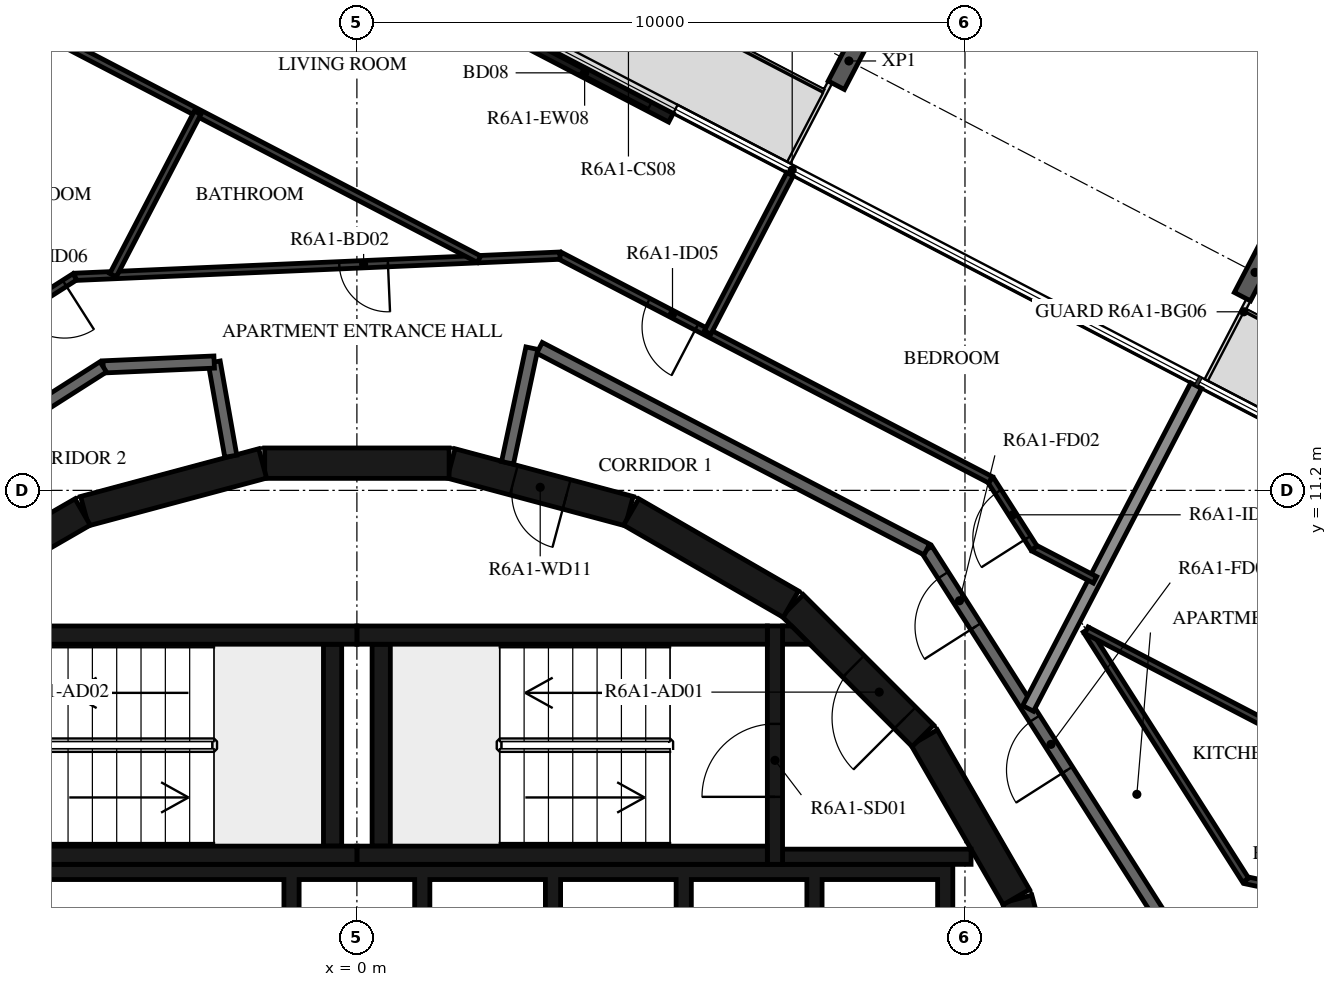
"""IFC4 building model, lengths in metres.
Left out: names, types, materials, properties, quantities, classifications, styles, units other than length and angle.
Written with IfcOpenShell. Run it as: python <this file> out.ifc"""

import sys

from ifc_helpers import new_model, si_unit, direction, frame, frame_2d, origin, origin_2d, place, context, subcontext, project, spatial, polyline, rectangle, i_section, outline, extrude, element, fill, save


model = new_model("IFC4")
c1 = context("Model", 3, precision=1e-05, world=origin(), true_north=direction((0.0, 1.0)))
c2 = subcontext(c1, "Body", "Model", "MODEL_VIEW")
j1 = project(units=[si_unit("LENGTHUNIT", "METRE"), si_unit("PLANEANGLEUNIT", "RADIAN")], contexts=[c1])
p1 = place(None, origin())
s1 = spatial("IfcSite", under=j1, at=p1, CompositionType="ELEMENT")
p2 = place(p1, origin())
s2 = spatial("IfcBuilding", under=s1, at=p2, CompositionType="ELEMENT")
p3 = place(p2, frame((0.0, 0.0, 230.2)))
s3 = spatial("IfcBuildingStorey", under=s2, at=p3, CompositionType="ELEMENT", Elevation=230.2)
for number, where, z_axis, x_axis in (
    (1, (14.771, 14.784, -0.38), (0.0, 0.0, 1.0), (0.887, -0.462, 0.0)),
    (2, (8.091, 18.261, -0.38), (0.0, 0.0, 1.0), (0.887, -0.462, 0.0)),
):
    element("IfcColumn", number, at=place(p3, frame(where, z_axis=z_axis, x_axis=x_axis)), inside=s3, PredefinedType="COLUMN", context=c2, shape_type="SweptSolid", body=[
        extrude(i_section(OverallWidth=0.3, OverallDepth=0.9, WebThickness=0.019, FlangeThickness=0.035, FilletRadius=0.03, at=origin_2d()), origin(), (0.0, 0.0, 1.0), 3.5),
    ])
p4 = place(p3, frame((5.164, 17.327, 0.0), z_axis=(0.0, 0.0, 1.0), x_axis=(-0.886983100078, 0.461801884119, 0.0)))
e3 = element("IfcWall", 3, at=p4, inside=s3, PredefinedType="STANDARD", context=c2, shape_type="SweptSolid", body=[
    extrude(rectangle(XDim=3.2, YDim=0.16, at=frame_2d((1.6, 0.0))), origin(), (0.0, 0.0, 1.0), 3.12),
])
p5 = place(p4, frame((0.4, 0.0, 0.0)))
e4 = element("IfcOpeningElement", 4, at=p5, cuts=e3, PredefinedType="OPENING", context=c2, shape_type="SweptSolid", body=[
    extrude(rectangle(XDim=2.4, YDim=2.4, at=frame_2d((1.2, 1.2))), frame((0.0, 0.09, 0.0), z_axis=(0.0, -1.0, 0.0), x_axis=(1.0, 0.0, 0.0)), (0.0, 0.0, 1.0), 0.18),
])
for number, where, z_axis, x_axis in (
    (5, (11.643, 1.55, 0.0), (0.0, 0.0, 1.0), (-0.259, 0.966, 0.0)),
    (6, (10.845, 4.51, 0.0), (0.0, 0.0, 1.0), (-0.5, 0.866, 0.0)),
):
    element("IfcWall", number, at=place(p3, frame(where, z_axis=z_axis, x_axis=x_axis)), inside=s3, PredefinedType="SHEAR", context=c2, shape_type="SweptSolid", body=[
        extrude(rectangle(XDim=3.033, YDim=0.5, at=frame_2d((1.516, 0.0))), origin(), (0.0, 0.0, 1.0), 3.12),
    ])
p6 = place(p3, frame((9.308, 7.164, 0.0), z_axis=(0.0, 0.0, 1.0), x_axis=(-0.707106781187, 0.707106781187, 0.0)))
e7 = element("IfcWall", 7, at=p6, inside=s3, PredefinedType="SHEAR", context=c2, shape_type="SweptSolid", body=[
    extrude(rectangle(XDim=3.032, YDim=0.5, at=frame_2d((1.516, 0.0))), origin(), (0.0, 0.0, 1.0), 3.12),
])
p7 = place(p6, frame((0.416, 0.0, 0.0)))
e8 = element("IfcOpeningElement", 8, at=p7, cuts=e7, PredefinedType="OPENING", context=c2, shape_type="SweptSolid", body=[
    extrude(rectangle(XDim=1.2, YDim=2.1, at=frame_2d((0.6, 1.05))), frame((0.0, 0.26, 0.0), z_axis=(0.0, -1.0, 0.0), x_axis=(1.0, 0.0, 0.0)), (0.0, 0.0, 1.0), 0.52),
])
p8 = place(p3, frame((7.137, 9.329, 0.0), z_axis=(0.0, 0.0, 1.0), x_axis=(-0.865975092491, 0.500087131594, 0.0)))
e9 = element("IfcWall", 9, at=p8, inside=s3, PredefinedType="SHEAR", context=c2, shape_type="SweptSolid", body=[
    extrude(rectangle(XDim=3.033, YDim=0.5, at=frame_2d((1.516, 0.0))), origin(), (0.0, 0.0, 1.0), 3.12),
])
p9 = place(p3, frame((4.479, 10.858, 0.0), z_axis=(0.0, 0.0, 1.0), x_axis=(-0.965948410781, 0.258734743916, 0.0)))
e10 = element("IfcWall", 10, at=p9, inside=s3, PredefinedType="SHEAR", context=c2, shape_type="SweptSolid", body=[
    extrude(rectangle(XDim=3.033, YDim=0.5, at=frame_2d((1.516, 0.0))), origin(), (0.0, 0.0, 1.0), 3.12),
])
p10 = place(p9, frame((1.066, 0.0, 0.0)))
e11 = element("IfcOpeningElement", 11, at=p10, cuts=e10, PredefinedType="OPENING", context=c2, shape_type="SweptSolid", body=[
    extrude(rectangle(XDim=0.9, YDim=2.1, at=frame_2d((0.45, 1.05))), frame((0.0, 0.26, 0.0), z_axis=(0.0, -1.0, 0.0), x_axis=(1.0, 0.0, 0.0)), (0.0, 0.0, 1.0), 0.52),
])
for number, where, z_axis, x_axis in (
    (12, (1.516, 11.647, 0.0), (0.0, 0.0, 1.0), (-1.0, 0.0, 0.0)),
    (13, (-1.55, 11.643, 0.0), (0.0, 0.0, 1.0), (-0.966, -0.259, 0.0)),
    (14, (-4.51, 10.845, 0.0), (0.0, 0.0, 1.0), (-0.866, -0.5, 0.0)),
):
    element("IfcWall", number, at=place(p3, frame(where, z_axis=z_axis, x_axis=x_axis)), inside=s3, PredefinedType="SHEAR", context=c2, shape_type="SweptSolid", body=[
        extrude(rectangle(XDim=3.033, YDim=0.5, at=frame_2d((1.516, 0.0))), origin(), (0.0, 0.0, 1.0), 3.12),
    ])
for number, where, z_axis, x_axis in (
    (15, (0.0, 5.2, 0.0), (0.0, 0.0, 1.0), (1.0, 0.0, 0.0)),
    (16, (0.0, 8.82, 0.0), (0.0, 0.0, 1.0), (1.0, 0.0, 0.0)),
):
    element("IfcWall", number, at=place(p3, frame(where, z_axis=z_axis, x_axis=x_axis)), inside=s3, PredefinedType="SHEAR", context=c2, shape_type="SweptSolid", body=[
        extrude(rectangle(XDim=6.75, YDim=0.3, at=frame_2d((3.375, 0.0))), origin(), (0.0, 0.0, 1.0), 3.12),
    ])
p11 = place(p3, frame((0.4, 5.35, 0.0), z_axis=(0.0, 0.0, 1.0), x_axis=(0.0, 1.0, 0.0)))
e17 = element("IfcWall", 17, at=p11, inside=s3, PredefinedType="SHEAR", context=c2, shape_type="SweptSolid", body=[
    extrude(rectangle(XDim=3.32, YDim=0.3, at=frame_2d((1.66, 0.0))), origin(), (0.0, 0.0, 1.0), 3.12),
])
p12 = place(p3, frame((6.875, 5.05, 0.0), z_axis=(0.0, 0.0, 1.0), x_axis=(0.0, 1.0, 0.0)))
e18 = element("IfcWall", 18, at=p12, inside=s3, PredefinedType="SHEAR", context=c2, shape_type="SweptSolid", body=[
    extrude(rectangle(XDim=3.92, YDim=0.25, at=frame_2d((1.96, 0.0))), origin(), (0.0, 0.0, 1.0), 3.12),
])
p13 = place(p12, frame((1.11, 0.0, 0.0)))
e19 = element("IfcOpeningElement", 19, at=p13, cuts=e18, PredefinedType="OPENING", context=c2, shape_type="SweptSolid", body=[
    extrude(rectangle(XDim=1.2, YDim=2.1, at=frame_2d((0.6, 1.05))), frame((0.0, 0.135, 0.0), z_axis=(0.0, -1.0, 0.0), x_axis=(1.0, 0.0, 0.0)), (0.0, 0.0, 1.0), 0.27),
])
p14 = place(p3, frame((7.0, 5.175, 0.0), z_axis=(0.0, 0.0, 1.0), x_axis=(1.0, 0.0, 0.0)))
e20 = element("IfcWall", 20, at=p14, inside=s3, PredefinedType="SHEAR", context=c2, shape_type="SweptSolid", body=[
    extrude(rectangle(XDim=3.1, YDim=0.25, at=frame_2d((1.55, 0.0))), origin(), (0.0, 0.0, 1.0), 3.12),
])
p15 = place(p3, origin())
e21 = element("IfcWall", 21, at=p15, inside=s3, PredefinedType="SHEAR", context=c2, shape_type="SweptSolid", body=[
    extrude(outline(polyline([(7.448, 8.67), (7.0, 8.67), (7.0, 8.97), (7.148, 8.97), (7.448, 8.67)])), origin(), (0.0, 0.0, 1.0), 3.12),
])
for number, where, z_axis, x_axis in (
    (22, (-6.75, 5.2, 0.0), (0.0, 0.0, 1.0), (1.0, 0.0, 0.0)),
    (23, (-6.75, 8.82, 0.0), (0.0, 0.0, 1.0), (1.0, 0.0, 0.0)),
):
    element("IfcWall", number, at=place(p3, frame(where, z_axis=z_axis, x_axis=x_axis)), inside=s3, PredefinedType="SHEAR", context=c2, shape_type="SweptSolid", body=[
        extrude(rectangle(XDim=6.75, YDim=0.3, at=frame_2d((3.375, 0.0))), origin(), (0.0, 0.0, 1.0), 3.12),
    ])
p16 = place(p3, frame((-0.4, 5.35, 0.0), z_axis=(0.0, 0.0, 1.0), x_axis=(0.0, 1.0, 0.0)))
e24 = element("IfcWall", 24, at=p16, inside=s3, PredefinedType="SHEAR", context=c2, shape_type="SweptSolid", body=[
    extrude(rectangle(XDim=3.32, YDim=0.3, at=frame_2d((1.66, 0.0))), origin(), (0.0, 0.0, 1.0), 3.12),
])
p17 = place(p3, origin())
e25 = element("IfcWall", 25, at=p17, inside=s3, PredefinedType="SHEAR", context=c2, shape_type="SweptSolid", body=[
    extrude(outline(polyline([(-9.55, 4.8), (-5.5, 4.8), (-5.5, 1.9), (-5.25, 1.9), (-5.25, 4.8), (-1.2, 4.8), (-1.2, 1.9), (-0.95, 1.9), (-0.95, 4.8), (0.95, 4.8), (0.95, 1.9), (1.2, 1.9), (1.2, 4.8), (3.1, 4.8), (3.1, 1.9), (3.35, 1.9), (3.35, 4.8), (5.25, 4.8), (5.25, 1.9), (5.5, 1.9), (5.5, 4.8), (7.4, 4.8), (7.4, 1.9), (7.65, 1.9), (7.65, 4.8), (9.55, 4.8), (9.55, 1.9), (9.8, 1.9), (9.8, 4.8), (9.8, 5.05), (-9.8, 5.05), (-9.8, 4.8), (-9.8, 1.9), (-9.55, 1.9), (-9.55, 4.8)])), origin(), (0.0, 0.0, 1.0), 3.12),
])
p18 = place(p3, frame((13.231, 4.172, 0.0), z_axis=(0.0, 0.0, 1.0), x_axis=(-0.537304397561, 0.843388394728, 0.0)))
e26 = element("IfcWall", 26, at=p18, inside=s3, PredefinedType="STANDARD", context=c2, shape_type="SweptSolid", body=[
    extrude(rectangle(XDim=7.181, YDim=0.2, at=frame_2d((3.59, 0.0))), origin(), (0.0, 0.0, 1.0), 3.12),
])
p19 = place(p18, frame((2.881, 0.0, 0.0)))
e27 = element("IfcOpeningElement", 27, at=p19, cuts=e26, PredefinedType="OPENING", context=c2, shape_type="SweptSolid", body=[
    extrude(rectangle(XDim=1.0, YDim=2.1, at=frame_2d((0.5, 1.05))), frame((0.0, 0.11, 0.0), z_axis=(0.0, -1.0, 0.0), x_axis=(1.0, 0.0, 0.0)), (0.0, 0.0, 1.0), 0.22),
])
p20 = place(p18, frame((5.681, 0.0, 0.0)))
e28 = element("IfcOpeningElement", 28, at=p20, cuts=e26, PredefinedType="OPENING", context=c2, shape_type="SweptSolid", body=[
    extrude(rectangle(XDim=1.0, YDim=2.1, at=frame_2d((0.5, 1.05))), frame((0.0, 0.11, 0.0), z_axis=(0.0, -1.0, 0.0), x_axis=(1.0, 0.0, 0.0)), (0.0, 0.0, 1.0), 0.22),
])
p21 = place(p3, frame((9.372, 10.228, 0.0), z_axis=(0.0, 0.0, 1.0), x_axis=(-0.887005184532, 0.461759464021, 0.0)))
e29 = element("IfcWall", 29, at=p21, inside=s3, PredefinedType="STANDARD", context=c2, shape_type="SweptSolid", body=[
    extrude(rectangle(XDim=7.181, YDim=0.2, at=frame_2d((3.591, 0.0))), origin(), (0.0, 0.0, 1.0), 3.12),
])
p22 = place(p3, frame((2.878, 13.538, 0.0), z_axis=(0.0, 0.0, 1.0), x_axis=(-0.207893604596, -0.978151444904, 0.0)))
e30 = element("IfcWall", 30, at=p22, inside=s3, PredefinedType="STANDARD", context=c2, shape_type="SweptSolid", body=[
    extrude(rectangle(XDim=1.927, YDim=0.2, at=frame_2d((0.963, 0.0))), origin(), (0.0, 0.0, 1.0), 3.12),
])
p23 = place(p3, frame((-2.074, 11.761, 0.0), z_axis=(0.0, 0.0, 1.0), x_axis=(-0.173679082312, 0.984802303189, 0.0)))
e31 = element("IfcWall", 31, at=p23, inside=s3, PredefinedType="STANDARD", context=c2, shape_type="SweptSolid", body=[
    extrude(rectangle(XDim=1.573, YDim=0.2, at=frame_2d((0.787, 0.0))), origin(), (0.0, 0.0, 1.0), 3.12),
])
p24 = place(p3, frame((-2.347, 13.31, 0.0), z_axis=(0.0, 0.0, 1.0), x_axis=(-0.999050095671, -0.043576442492, 0.0)))
e32 = element("IfcWall", 32, at=p24, inside=s3, PredefinedType="STANDARD", context=c2, shape_type="SweptSolid", body=[
    extrude(rectangle(XDim=1.826, YDim=0.2, at=frame_2d((0.913, 0.0))), origin(), (0.0, 0.0, 1.0), 3.12),
])
p25 = place(p3, frame((-4.172, 13.231, 0.0), z_axis=(0.0, 0.0, 1.0), x_axis=(-0.843388394728, -0.537304397561, 0.0)))
e33 = element("IfcWall", 33, at=p25, inside=s3, PredefinedType="STANDARD", context=c2, shape_type="SweptSolid", body=[
    extrude(rectangle(XDim=7.181, YDim=0.2, at=frame_2d((3.59, 0.0))), origin(), (0.0, 0.0, 1.0), 3.12),
])
p26 = place(p3, frame((13.801, 12.922, 0.0), z_axis=(0.0, 0.0, 1.0), x_axis=(-0.461726485624, -0.887022351733, 0.0)))
e34 = element("IfcWall", 34, at=p26, inside=s3, PredefinedType="STANDARD", context=c2, shape_type="SweptSolid", body=[
    extrude(rectangle(XDim=5.984, YDim=0.2, at=frame_2d((2.992, 0.0))), origin(), (0.0, 0.0, 1.0), 2.73),
])
p27 = place(p3, frame((19.505, 3.763, 0.0), z_axis=(0.0, 0.0, 1.0), x_axis=(-0.978660081285, 0.205485876157, 0.0)))
e35 = element("IfcWall", 35, at=p27, inside=s3, PredefinedType="PARTITIONING", context=c2, shape_type="SweptSolid", body=[
    extrude(rectangle(XDim=4.996, YDim=0.12, at=frame_2d((2.498, 0.0))), origin(), (0.0, 0.0, 1.0), 3.12),
])
p28 = place(p27, frame((0.2, 0.0, 0.0)))
e36 = element("IfcOpeningElement", 36, at=p28, cuts=e35, PredefinedType="OPENING", context=c2, shape_type="SweptSolid", body=[
    extrude(rectangle(XDim=0.8, YDim=2.1, at=frame_2d((0.4, 1.05))), frame((0.0, 0.07, 0.0), z_axis=(0.0, -1.0, 0.0), x_axis=(1.0, 0.0, 0.0)), (0.0, 0.0, 1.0), 0.14),
])
p29 = place(p27, frame((2.869, 0.0, 0.0)))
e37 = element("IfcOpeningElement", 37, at=p29, cuts=e35, PredefinedType="OPENING", context=c2, shape_type="SweptSolid", body=[
    extrude(rectangle(XDim=0.9, YDim=2.1, at=frame_2d((0.45, 1.05))), frame((0.0, 0.07, 0.0), z_axis=(0.0, -1.0, 0.0), x_axis=(1.0, 0.0, 0.0)), (0.0, 0.0, 1.0), 0.14),
])
p30 = place(p3, frame((14.615, 4.79, 0.0), z_axis=(0.0, 0.0, 1.0), x_axis=(-0.537312928062, 0.843382960071, 0.0)))
e38 = element("IfcWall", 38, at=p30, inside=s3, PredefinedType="PARTITIONING", context=c2, shape_type="SweptSolid", body=[
    extrude(rectangle(XDim=4.875, YDim=0.12, at=frame_2d((2.437, 0.0))), origin(), (0.0, 0.0, 1.0), 3.12),
])
p31 = place(p3, frame((21.085, 4.169, 0.0), z_axis=(0.0, 0.0, 1.0), x_axis=(-0.887017373034, 0.461736050071, 0.0)))
e39 = element("IfcWall", 39, at=p31, inside=s3, PredefinedType="PARTITIONING", context=c2, shape_type="SweptSolid", body=[
    extrude(rectangle(XDim=10.247, YDim=0.12, at=frame_2d((5.123, 0.0))), origin(), (0.0, 0.0, 1.0), 3.12),
])
p32 = place(p31, frame((3.425, 0.0, 0.0)))
e40 = element("IfcOpeningElement", 40, at=p32, cuts=e39, PredefinedType="OPENING", context=c2, shape_type="SweptSolid", body=[
    extrude(rectangle(XDim=0.9, YDim=2.1, at=frame_2d((0.45, 1.05))), frame((0.0, 0.07, 0.0), z_axis=(0.0, -1.0, 0.0), x_axis=(1.0, 0.0, 0.0)), (0.0, 0.0, 1.0), 0.14),
])
p33 = place(p3, frame((12.139, 9.729, 0.0), z_axis=(0.0, 0.0, 1.0), x_axis=(-0.887046876331, 0.461679368383, 0.0)))
e41 = element("IfcWall", 41, at=p33, inside=s3, PredefinedType="PARTITIONING", context=c2, shape_type="SweptSolid", body=[
    extrude(rectangle(XDim=1.13, YDim=0.12, at=frame_2d((0.565, 0.0))), origin(), (0.0, 0.0, 1.0), 3.12),
])
p34 = place(p3, frame((11.137, 10.25, 0.0), z_axis=(0.0, 0.0, 1.0), x_axis=(-0.537231369635, 0.843434914786, 0.0)))
e42 = element("IfcWall", 42, at=p34, inside=s3, PredefinedType="PARTITIONING", context=c2, shape_type="SweptSolid", body=[
    extrude(rectangle(XDim=1.332, YDim=0.12, at=frame_2d((0.666, 0.0))), origin(), (0.0, 0.0, 1.0), 3.12),
])
p35 = place(p34, frame((0.2, 0.0, 0.0)))
e43 = element("IfcOpeningElement", 43, at=p35, cuts=e42, PredefinedType="OPENING", context=c2, shape_type="SweptSolid", body=[
    extrude(rectangle(XDim=0.9, YDim=2.1, at=frame_2d((0.45, 1.05))), frame((0.0, 0.07, 0.0), z_axis=(0.0, -1.0, 0.0), x_axis=(1.0, 0.0, 0.0)), (0.0, 0.0, 1.0), 0.14),
])
p36 = place(p3, frame((10.421, 11.373, 0.0), z_axis=(0.0, 0.0, 1.0), x_axis=(-0.887012970857, 0.461744506769, 0.0)))
e44 = element("IfcWall", 44, at=p36, inside=s3, PredefinedType="PARTITIONING", context=c2, shape_type="SweptSolid", body=[
    extrude(rectangle(XDim=7.985, YDim=0.12, at=frame_2d((3.992, 0.0))), origin(), (0.0, 0.0, 1.0), 3.12),
])
p37 = place(p36, frame((5.448, 0.0, 0.0)))
e45 = element("IfcOpeningElement", 45, at=p37, cuts=e44, PredefinedType="OPENING", context=c2, shape_type="SweptSolid", body=[
    extrude(rectangle(XDim=0.9, YDim=2.1, at=frame_2d((0.45, 1.05))), frame((0.0, 0.07, 0.0), z_axis=(0.0, -1.0, 0.0), x_axis=(1.0, 0.0, 0.0)), (0.0, 0.0, 1.0), 0.14),
])
p38 = place(p3, frame((3.339, 15.06, 0.0), z_axis=(0.0, 0.0, 1.0), x_axis=(-0.999047716945, -0.043630943905, 0.0)))
e46 = element("IfcWall", 46, at=p38, inside=s3, PredefinedType="PARTITIONING", context=c2, shape_type="SweptSolid", body=[
    extrude(rectangle(XDim=7.985, YDim=0.12, at=frame_2d((3.992, 0.0))), origin(), (0.0, 0.0, 1.0), 3.12),
])
p39 = place(p38, frame((2.831, 0.0, 0.0)))
e47 = element("IfcOpeningElement", 47, at=p39, cuts=e46, PredefinedType="OPENING", context=c2, shape_type="SweptSolid", body=[
    extrude(rectangle(XDim=0.8, YDim=2.1, at=frame_2d((0.4, 1.05))), frame((0.0, 0.07, 0.0), z_axis=(0.0, -1.0, 0.0), x_axis=(1.0, 0.0, 0.0)), (0.0, 0.0, 1.0), 0.14),
])
p40 = place(p3, frame((-4.639, 14.712, 0.0), z_axis=(0.0, 0.0, 1.0), x_axis=(-0.843361471414, -0.537346655833, 0.0)))
e48 = element("IfcWall", 48, at=p40, inside=s3, PredefinedType="PARTITIONING", context=c2, shape_type="SweptSolid", body=[
    extrude(rectangle(XDim=1.844, YDim=0.12, at=frame_2d((0.922, 0.0))), origin(), (0.0, 0.0, 1.0), 3.12),
])
p41 = place(p40, frame((0.2, 0.0, 0.0)))
e49 = element("IfcOpeningElement", 49, at=p41, cuts=e48, PredefinedType="OPENING", context=c2, shape_type="SweptSolid", body=[
    extrude(rectangle(XDim=0.9, YDim=2.1, at=frame_2d((0.45, 1.05))), frame((0.0, 0.07, 0.0), z_axis=(0.0, -1.0, 0.0), x_axis=(1.0, 0.0, 0.0)), (0.0, 0.0, 1.0), 0.14),
])
p42 = place(p3, frame((7.122, 16.399, 0.0), z_axis=(0.0, 0.0, 1.0), x_axis=(-0.461763975246, -0.887002836053, 0.0)))
e50 = element("IfcWall", 50, at=p42, inside=s3, PredefinedType="PARTITIONING", context=c2, shape_type="SweptSolid", body=[
    extrude(rectangle(XDim=2.934, YDim=0.12, at=frame_2d((1.467, 0.0))), origin(), (0.0, 0.0, 1.0), 2.73),
])
p43 = place(p3, frame((-8.35, 20.394, 0.0), z_axis=(0.0, 0.0, 1.0), x_axis=(0.887020940825, -0.461729196107, 0.0)))
e51 = element("IfcWall", 51, at=p43, inside=s3, PredefinedType="PARTITIONING", context=c2, shape_type="SweptSolid", body=[
    extrude(rectangle(XDim=11.678, YDim=0.12, at=frame_2d((5.839, 0.0))), origin(), (0.0, 0.0, 1.0), 3.12),
])
p44 = place(p3, frame((-2.619, 17.411, 0.0), z_axis=(0.0, 0.0, 1.0), x_axis=(-0.461743141736, -0.887013681439, 0.0)))
e52 = element("IfcWall", 52, at=p44, inside=s3, PredefinedType="PARTITIONING", context=c2, shape_type="SweptSolid", body=[
    extrude(rectangle(XDim=3.012, YDim=0.12, at=frame_2d((1.506, 0.0))), origin(), (0.0, 0.0, 1.0), 3.12),
])
p45 = place(p5, origin())
e53 = element("IfcDoor", 53, at=p45, inside=s3, OperationType="DOUBLE_DOOR_SLIDING", PredefinedType="DOOR", context=c2, shape_type="SweptSolid", body=[
    extrude(rectangle(XDim=2.4, YDim=2.4, at=frame_2d((1.2, 1.2))), frame((0.0, 0.025, 0.0), z_axis=(0.0, -1.0, 0.0), x_axis=(1.0, 0.0, 0.0)), (0.0, 0.0, 1.0), 0.05),
])
fill(e4, e53)
p46 = place(p13, origin())
e54 = element("IfcDoor", 54, at=p46, inside=s3, OperationType="SINGLE_SWING_LEFT", PredefinedType="DOOR", context=c2, shape_type="SweptSolid", body=[
    extrude(rectangle(XDim=1.2, YDim=2.1, at=frame_2d((0.6, 1.05))), frame((0.0, 0.025, 0.0), z_axis=(0.0, -1.0, 0.0), x_axis=(1.0, 0.0, 0.0)), (0.0, 0.0, 1.0), 0.05),
])
fill(e19, e54)
p47 = place(p7, origin())
e55 = element("IfcDoor", 55, at=p47, inside=s3, OperationType="SINGLE_SWING_RIGHT", PredefinedType="DOOR", context=c2, shape_type="SweptSolid", body=[
    extrude(rectangle(XDim=1.2, YDim=2.1, at=frame_2d((0.6, 1.05))), frame((0.0, 0.025, 0.0), z_axis=(0.0, -1.0, 0.0), x_axis=(1.0, 0.0, 0.0)), (0.0, 0.0, 1.0), 0.05),
])
fill(e8, e55)
p48 = place(p10, origin())
e56 = element("IfcDoor", 56, at=p48, inside=s3, OperationType="SINGLE_SWING_LEFT", PredefinedType="DOOR", context=c2, shape_type="SweptSolid", body=[
    extrude(rectangle(XDim=0.9, YDim=2.1, at=frame_2d((0.45, 1.05))), frame((0.0, 0.025, 0.0), z_axis=(0.0, -1.0, 0.0), x_axis=(1.0, 0.0, 0.0)), (0.0, 0.0, 1.0), 0.05),
])
fill(e11, e56)
p49 = place(p19, origin())
e57 = element("IfcDoor", 57, at=p49, inside=s3, OperationType="SINGLE_SWING_LEFT", PredefinedType="DOOR", context=c2, shape_type="SweptSolid", body=[
    extrude(rectangle(XDim=1.0, YDim=2.1, at=frame_2d((0.5, 1.05))), frame((0.0, 0.025, 0.0), z_axis=(0.0, -1.0, 0.0), x_axis=(1.0, 0.0, 0.0)), (0.0, 0.0, 1.0), 0.05),
])
fill(e27, e57)
p50 = place(p20, origin())
e58 = element("IfcDoor", 58, at=p50, inside=s3, OperationType="SINGLE_SWING_LEFT", PredefinedType="DOOR", context=c2, shape_type="SweptSolid", body=[
    extrude(rectangle(XDim=1.0, YDim=2.1, at=frame_2d((0.5, 1.05))), frame((0.0, 0.025, 0.0), z_axis=(0.0, -1.0, 0.0), x_axis=(1.0, 0.0, 0.0)), (0.0, 0.0, 1.0), 0.05),
])
fill(e28, e58)
p51 = place(p35, origin())
e59 = element("IfcDoor", 59, at=p51, inside=s3, OperationType="SINGLE_SWING_LEFT", PredefinedType="DOOR", context=c2, shape_type="SweptSolid", body=[
    extrude(rectangle(XDim=0.9, YDim=2.1, at=frame_2d((0.45, 1.05))), frame((0.0, 0.025, 0.0), z_axis=(0.0, -1.0, 0.0), x_axis=(1.0, 0.0, 0.0)), (0.0, 0.0, 1.0), 0.05),
])
fill(e43, e59)
p52 = place(p37, origin())
e60 = element("IfcDoor", 60, at=p52, inside=s3, OperationType="SINGLE_SWING_RIGHT", PredefinedType="DOOR", context=c2, shape_type="SweptSolid", body=[
    extrude(rectangle(XDim=0.9, YDim=2.1, at=frame_2d((0.45, 1.05))), frame((0.0, 0.025, 0.0), z_axis=(0.0, -1.0, 0.0), x_axis=(1.0, 0.0, 0.0)), (0.0, 0.0, 1.0), 0.05),
])
fill(e45, e60)
p53 = place(p39, origin())
e61 = element("IfcDoor", 61, at=p53, inside=s3, OperationType="SINGLE_SWING_RIGHT", PredefinedType="DOOR", context=c2, shape_type="SweptSolid", body=[
    extrude(rectangle(XDim=0.8, YDim=2.1, at=frame_2d((0.4, 1.05))), frame((0.0, 0.025, 0.0), z_axis=(0.0, -1.0, 0.0), x_axis=(1.0, 0.0, 0.0)), (0.0, 0.0, 1.0), 0.05),
])
fill(e47, e61)
p54 = place(p41, origin())
e62 = element("IfcDoor", 62, at=p54, inside=s3, OperationType="SINGLE_SWING_RIGHT", PredefinedType="DOOR", context=c2, shape_type="SweptSolid", body=[
    extrude(rectangle(XDim=0.9, YDim=2.1, at=frame_2d((0.45, 1.05))), frame((0.0, 0.025, 0.0), z_axis=(0.0, -1.0, 0.0), x_axis=(1.0, 0.0, 0.0)), (0.0, 0.0, 1.0), 0.05),
])
fill(e49, e62)
save(model, sys.argv[1])
